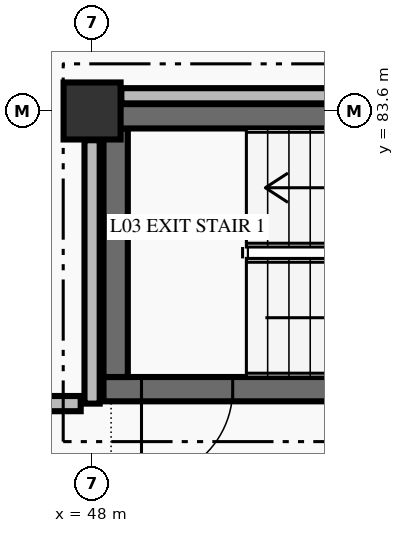
"""IFC4 building model, lengths in metres.
Left out: names, types, materials, properties, quantities, classifications, styles, units other than length and angle.
Written with IfcOpenShell. Run it as: python <this file> out.ifc"""

import sys

from ifc_helpers import new_model, si_unit, direction, frame, frame_2d, origin, origin_2d, place, context, subcontext, project, spatial, rectangle, extrude, element, fill, save


model = new_model("IFC4")
c1 = context("Model", 3, precision=1e-05, world=origin(), true_north=direction((0.0, 1.0)))
c2 = subcontext(c1, "Body", "Model", "MODEL_VIEW")
j1 = project(units=[si_unit("LENGTHUNIT", "METRE"), si_unit("PLANEANGLEUNIT", "RADIAN")], contexts=[c1])
p1 = place(None, origin())
s1 = spatial("IfcSite", under=j1, at=p1, CompositionType="ELEMENT")
p2 = place(p1, origin())
s2 = spatial("IfcBuilding", under=s1, at=p2, CompositionType="ELEMENT")
p3 = place(p2, frame((0.0, 0.0, 10.2)))
s3 = spatial("IfcBuildingStorey", under=s2, at=p3, CompositionType="ELEMENT", Elevation=10.2)
p4 = place(p3, frame((48.0, 83.6, 0.0), z_axis=(0.0, 0.0, 1.0), x_axis=(1.0, 0.0, 0.0)))
e1 = element("IfcColumn", 1, at=p4, inside=s3, PredefinedType="COLUMN", context=c2, shape_type="SweptSolid", body=[
    extrude(rectangle(XDim=0.75, YDim=0.75, at=origin_2d()), origin(), (0.0, 0.0, 1.0), 4.5),
])
p5 = place(p3, frame((55.85, 79.94, 0.0), z_axis=(0.0, 0.0, 1.0), x_axis=(-1.0, 0.0, 0.0)))
e2 = element("IfcWall", 2, at=p5, inside=s3, PredefinedType="SHEAR", context=c2, shape_type="SweptSolid", body=[
    extrude(rectangle(XDim=7.7, YDim=0.32, at=frame_2d((3.85, 0.0))), origin(), (0.0, 0.0, 1.0), 4.5),
])
p6 = place(p5, frame((6.0, 0.0, 0.0)))
e3 = element("IfcOpeningElement", 3, at=p6, cuts=e2, PredefinedType="OPENING", context=c2, shape_type="SweptSolid", body=[
    extrude(rectangle(XDim=1.2, YDim=2.2, at=frame_2d((0.6, 1.1))), frame((0.0, 0.17, 0.0), z_axis=(0.0, -1.0, 0.0), x_axis=(1.0, 0.0, 0.0)), (0.0, 0.0, 1.0), 0.34),
])
p7 = place(p3, frame((48.31, 80.1, 0.0), z_axis=(0.0, 0.0, 1.0), x_axis=(0.0, 1.0, 0.0)))
e4 = element("IfcWall", 4, at=p7, inside=s3, PredefinedType="SHEAR", context=c2, shape_type="SweptSolid", body=[
    extrude(rectangle(XDim=3.27, YDim=0.32, at=frame_2d((1.635, 0.0))), origin(), (0.0, 0.0, 1.0), 4.5),
])
p8 = place(p3, frame((48.15, 83.53, 0.0), z_axis=(0.0, 0.0, 1.0), x_axis=(1.0, 0.0, 0.0)))
e5 = element("IfcWall", 5, at=p8, inside=s3, PredefinedType="SHEAR", context=c2, shape_type="SweptSolid", body=[
    extrude(rectangle(XDim=7.7, YDim=0.32, at=frame_2d((3.85, 0.0))), origin(), (0.0, 0.0, 1.0), 4.5),
])
p9 = place(p3, frame((48.0, 79.75, 0.0), z_axis=(0.0, 0.0, 1.0), x_axis=(0.0, 1.0, 0.0)))
e6 = element("IfcWall", 6, at=p9, inside=s3, PredefinedType="STANDARD", context=c2, shape_type="SweptSolid", body=[
    extrude(rectangle(XDim=3.465, YDim=0.2, at=frame_2d((1.732, 0.0))), origin(), (0.0, 0.0, 1.0), 3.67),
])
p10 = place(p3, frame((48.385, 83.8, 0.0), z_axis=(0.0, 0.0, 1.0), x_axis=(1.0, 0.0, 0.0)))
e7 = element("IfcWall", 7, at=p10, inside=s3, PredefinedType="STANDARD", context=c2, shape_type="SweptSolid", body=[
    extrude(rectangle(XDim=7.23, YDim=0.2, at=frame_2d((3.615, 0.0))), origin(), (0.0, 0.0, 1.0), 3.47),
])
p11 = place(p3, frame((47.85, 79.75, 0.0), z_axis=(0.0, 0.0, 1.0), x_axis=(-1.0, 0.0, 0.0)))
e8 = element("IfcWall", 8, at=p11, inside=s3, PredefinedType="STANDARD", context=c2, shape_type="SweptSolid", body=[
    extrude(rectangle(XDim=28.195, YDim=0.2, at=frame_2d((14.098, 0.0))), origin(), (0.0, 0.0, 1.0), 4.26),
])
p12 = place(p11, frame((13.573, 0.0, 0.0)))
e9 = element("IfcOpeningElement", 9, at=p12, cuts=e8, PredefinedType="OPENING", context=c2, shape_type="SweptSolid", body=[
    extrude(rectangle(XDim=1.05, YDim=2.15, at=frame_2d((0.525, 1.075))), frame((0.0, 0.11, 0.0), z_axis=(0.0, -1.0, 0.0), x_axis=(1.0, 0.0, 0.0)), (0.0, 0.0, 1.0), 0.22),
])
p13 = place(p11, frame((15.073, 0.0, 0.0)))
e10 = element("IfcOpeningElement", 10, at=p13, cuts=e8, PredefinedType="OPENING", context=c2, shape_type="SweptSolid", body=[
    extrude(rectangle(XDim=1.05, YDim=2.15, at=frame_2d((0.525, 1.075))), frame((0.0, 0.11, 0.0), z_axis=(0.0, -1.0, 0.0), x_axis=(1.0, 0.0, 0.0)), (0.0, 0.0, 1.0), 0.22),
])
p14 = place(p6, origin())
e11 = element("IfcDoor", 11, at=p14, inside=s3, OperationType="SINGLE_SWING_RIGHT", PredefinedType="DOOR", context=c2, shape_type="SweptSolid", body=[
    extrude(rectangle(XDim=1.2, YDim=2.2, at=frame_2d((0.6, 1.1))), frame((0.0, 0.025, 0.0), z_axis=(0.0, -1.0, 0.0), x_axis=(1.0, 0.0, 0.0)), (0.0, 0.0, 1.0), 0.05),
])
fill(e3, e11)
save(model, sys.argv[1])
